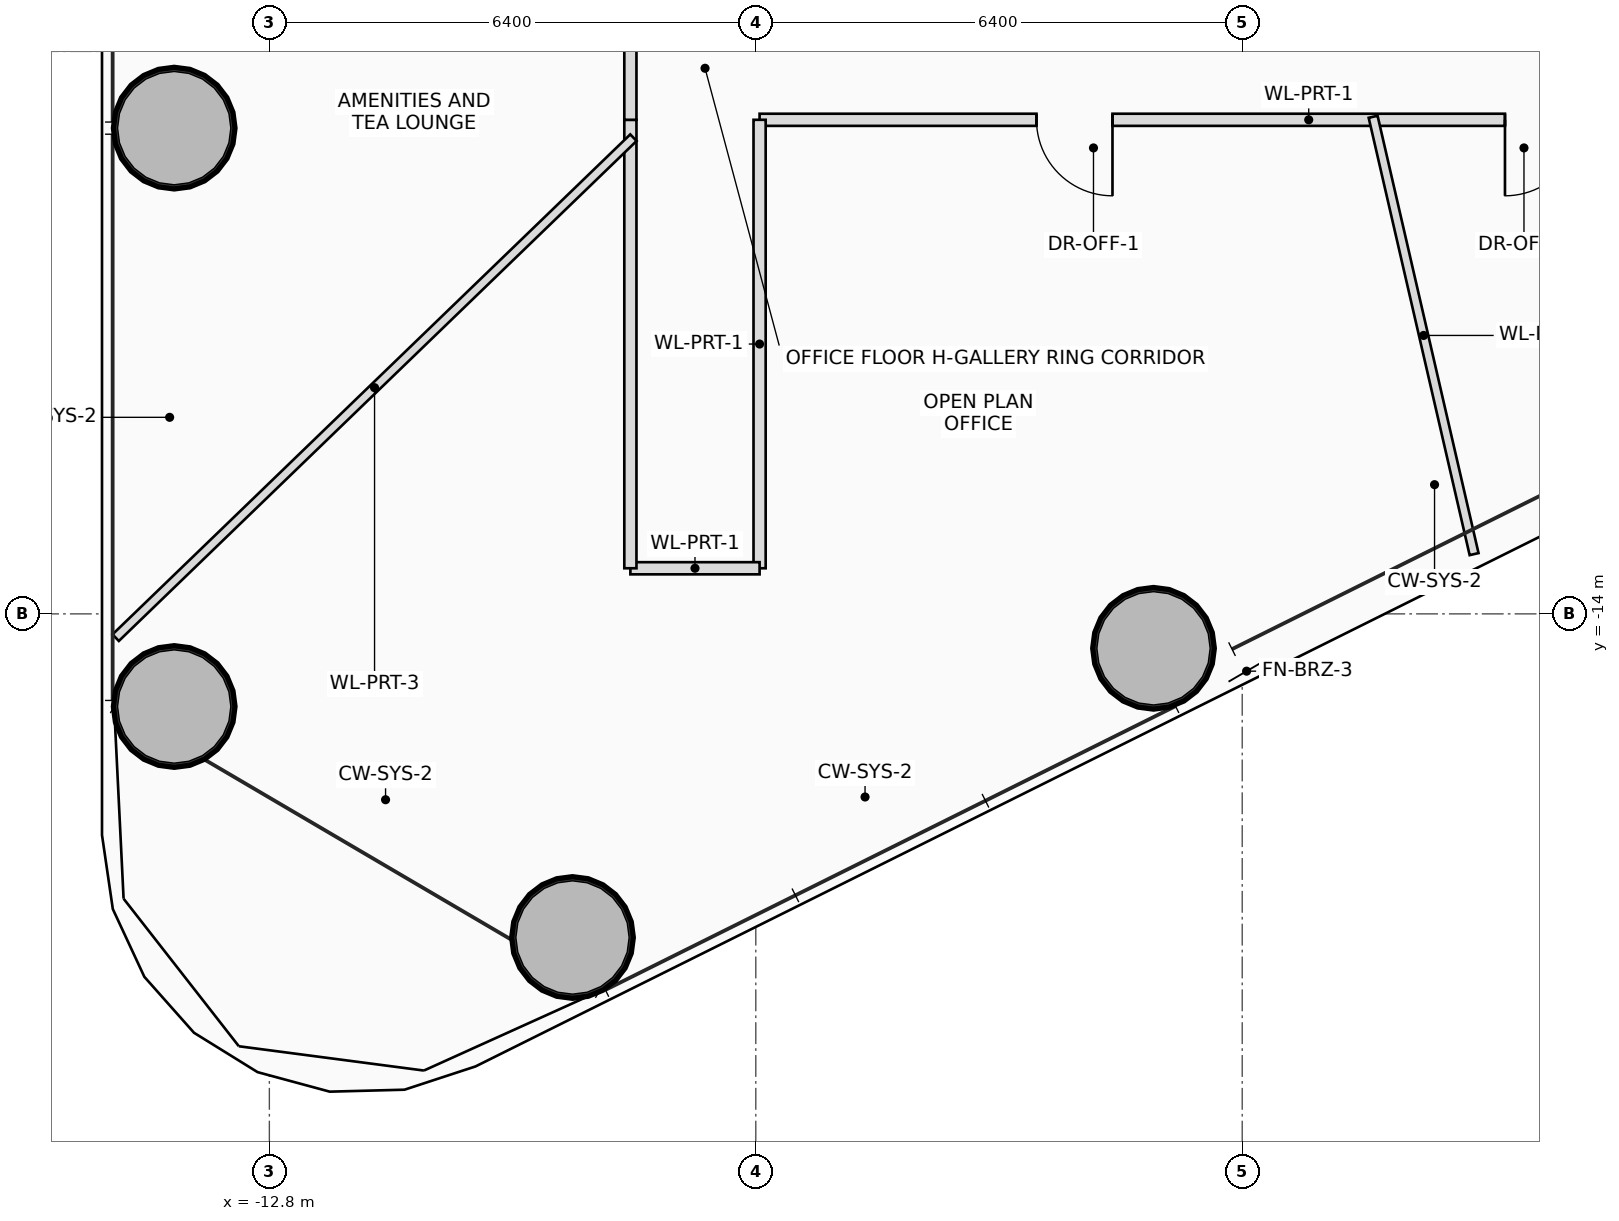
"""IFC4 building model, lengths in metres.
Left out: names, types, materials, properties, quantities, classifications, styles, units other than length and angle.
Written with IfcOpenShell. Run it as: python <this file> out.ifc"""

import sys

from ifc_helpers import new_model, si_unit, direction, frame, frame_2d, origin, origin_2d, place, context, subcontext, project, spatial, rectangle, hollow_circle, extrude, source, transform, mapped, element, fill, save


model = new_model("IFC4")
c1 = context("Model", 3, precision=1e-05, world=origin(), true_north=direction((0.0, 1.0)))
c2 = subcontext(c1, "Body", "Model", "MODEL_VIEW")
j1 = project(units=[si_unit("LENGTHUNIT", "METRE"), si_unit("PLANEANGLEUNIT", "RADIAN")], contexts=[c1])
p1 = place(None, origin())
s1 = spatial("IfcSite", under=j1, at=p1, CompositionType="ELEMENT")
p2 = place(p1, origin())
s2 = spatial("IfcBuilding", under=s1, at=p2, CompositionType="ELEMENT")
p3 = place(p2, frame((0.0, 0.0, 27.5)))
s3 = spatial("IfcBuildingStorey", under=s2, at=p3, CompositionType="ELEMENT", Elevation=27.5)
m1 = source(origin(), c2, "Body", "SweptSolid", [
    extrude(hollow_circle(Radius=0.8, WallThickness=0.055, at=origin_2d()), origin(), (0.0, 0.0, 1.0), 3.7),
])
for number, where, z_axis, x_axis in (
    (1, (-8.812, -18.258, 0.0), (0.0, 0.0, 1.0), (1.0, 0.0, 0.0)),
    (2, (-1.167, -14.453, 0.0), (0.0, 0.0, 1.0), (1.0, 0.0, 0.0)),
    (3, (-14.052, -7.61, 0.0), (0.0, 0.0, 1.0), (1.0, 0.0, 0.0)),
    (4, (-14.052, -15.219, 0.0), (0.0, 0.0, 1.0), (1.0, 0.0, 0.0)),
):
    element("IfcColumn", number, at=place(p3, frame(where, z_axis=z_axis, x_axis=x_axis)), inside=s3, PredefinedType="COLUMN", context=c2, shape_type="MappedRepresentation", body=[
        mapped(m1, transform((0.0, 0.0, 0.0), scale=1.0)),
    ])
p4 = place(p3, frame((6.35, -7.5, 0.0), z_axis=(0.0, 0.0, 1.0), x_axis=(-1.0, 0.0, 0.0)))
e5 = element("IfcWall", 5, at=p4, inside=s3, PredefinedType="PARTITIONING", context=c2, shape_type="SweptSolid", body=[
    extrude(rectangle(XDim=12.7, YDim=0.16, at=frame_2d((6.35, 0.0))), origin(), (0.0, 0.0, 1.0), 2.8),
])
p5 = place(p4, frame((1.893, 0.0, 0.0)))
e6 = element("IfcOpeningElement", 6, at=p5, cuts=e5, PredefinedType="OPENING", context=c2, shape_type="SweptSolid", body=[
    extrude(rectangle(XDim=1.0, YDim=2.25, at=frame_2d((0.5, 1.125))), frame((0.0, 0.09, 0.0), z_axis=(0.0, -1.0, 0.0), x_axis=(1.0, 0.0, 0.0)), (0.0, 0.0, 1.0), 0.18),
])
p6 = place(p4, frame((8.057, 0.0, 0.0)))
e7 = element("IfcOpeningElement", 7, at=p6, cuts=e5, PredefinedType="OPENING", context=c2, shape_type="SweptSolid", body=[
    extrude(rectangle(XDim=1.0, YDim=2.25, at=frame_2d((0.5, 1.125))), frame((0.0, 0.09, 0.0), z_axis=(0.0, -1.0, 0.0), x_axis=(1.0, 0.0, 0.0)), (0.0, 0.0, 1.0), 0.18),
])
p7 = place(p3, frame((-6.35, -7.5, 0.0), z_axis=(0.0, 0.0, 1.0), x_axis=(0.0, -1.0, 0.0)))
e8 = element("IfcWall", 8, at=p7, inside=s3, PredefinedType="PARTITIONING", context=c2, shape_type="SweptSolid", body=[
    extrude(rectangle(XDim=5.9, YDim=0.16, at=frame_2d((2.95, 0.0))), origin(), (0.0, 0.0, 1.0), 2.8),
])
p8 = place(p3, frame((-6.35, -13.4, 0.0), z_axis=(0.0, 0.0, 1.0), x_axis=(-1.0, 0.0, 0.0)))
e9 = element("IfcWall", 9, at=p8, inside=s3, PredefinedType="PARTITIONING", context=c2, shape_type="SweptSolid", body=[
    extrude(rectangle(XDim=1.7, YDim=0.16, at=frame_2d((0.85, 0.0))), origin(), (0.0, 0.0, 1.0), 2.8),
])
p9 = place(p3, frame((-8.05, -13.4, 0.0), z_axis=(0.0, 0.0, 1.0), x_axis=(0.0, 1.0, 0.0)))
e10 = element("IfcWall", 10, at=p9, inside=s3, PredefinedType="PARTITIONING", context=c2, shape_type="SweptSolid", body=[
    extrude(rectangle(XDim=5.9, YDim=0.16, at=frame_2d((2.95, 0.0))), origin(), (0.0, 0.0, 1.0), 2.8),
])
p10 = place(p3, frame((-8.05, -7.5, 0.0), z_axis=(0.0, 0.0, 1.0), x_axis=(0.0, 1.0, 0.0)))
e11 = element("IfcWall", 11, at=p10, inside=s3, PredefinedType="PARTITIONING", context=c2, shape_type="SweptSolid", body=[
    extrude(rectangle(XDim=15.0, YDim=0.16, at=frame_2d((7.5, 0.0))), origin(), (0.0, 0.0, 1.0), 2.8),
])
p11 = place(p10, frame((7.0, 0.0, 0.0)))
e12 = element("IfcOpeningElement", 12, at=p11, cuts=e11, PredefinedType="OPENING", context=c2, shape_type="SweptSolid", body=[
    extrude(rectangle(XDim=1.0, YDim=2.25, at=frame_2d((0.5, 1.125))), frame((0.0, 0.09, 0.0), z_axis=(0.0, -1.0, 0.0), x_axis=(1.0, 0.0, 0.0)), (0.0, 0.0, 1.0), 0.18),
])
p12 = place(p3, frame((-8.01, -7.735, 0.0), z_axis=(0.0, 0.0, 1.0), x_axis=(-0.719335268178, -0.694663063618, 0.0)))
e13 = element("IfcWall", 13, at=p12, inside=s3, PredefinedType="PARTITIONING", context=c2, shape_type="SweptSolid", body=[
    extrude(rectangle(XDim=9.47, YDim=0.12, at=frame_2d((4.735, 0.0))), origin(), (0.0, 0.0, 1.0), 2.8),
])
p13 = place(p3, frame((1.722, -7.46, 0.0), z_axis=(0.0, 0.0, 1.0), x_axis=(0.22494706926, -0.974370984806, 0.0)))
e14 = element("IfcWall", 14, at=p13, inside=s3, PredefinedType="PARTITIONING", context=c2, shape_type="SweptSolid", body=[
    extrude(rectangle(XDim=5.905, YDim=0.12, at=frame_2d((2.953, 0.0))), origin(), (0.0, 0.0, 1.0), 2.96),
])
p14 = place(p5, origin())
e15 = element("IfcDoor", 15, at=p14, inside=s3, OperationType="SINGLE_SWING_RIGHT", PredefinedType="DOOR", context=c2, shape_type="SweptSolid", body=[
    extrude(rectangle(XDim=1.0, YDim=2.25, at=frame_2d((0.5, 1.125))), frame((0.0, 0.025, 0.0), z_axis=(0.0, -1.0, 0.0), x_axis=(1.0, 0.0, 0.0)), (0.0, 0.0, 1.0), 0.05),
])
fill(e6, e15)
p15 = place(p6, origin())
e16 = element("IfcDoor", 16, at=p15, inside=s3, OperationType="SINGLE_SWING_LEFT", PredefinedType="DOOR", context=c2, shape_type="SweptSolid", body=[
    extrude(rectangle(XDim=1.0, YDim=2.25, at=frame_2d((0.5, 1.125))), frame((0.0, 0.025, 0.0), z_axis=(0.0, -1.0, 0.0), x_axis=(1.0, 0.0, 0.0)), (0.0, 0.0, 1.0), 0.05),
])
fill(e7, e16)
save(model, sys.argv[1])
